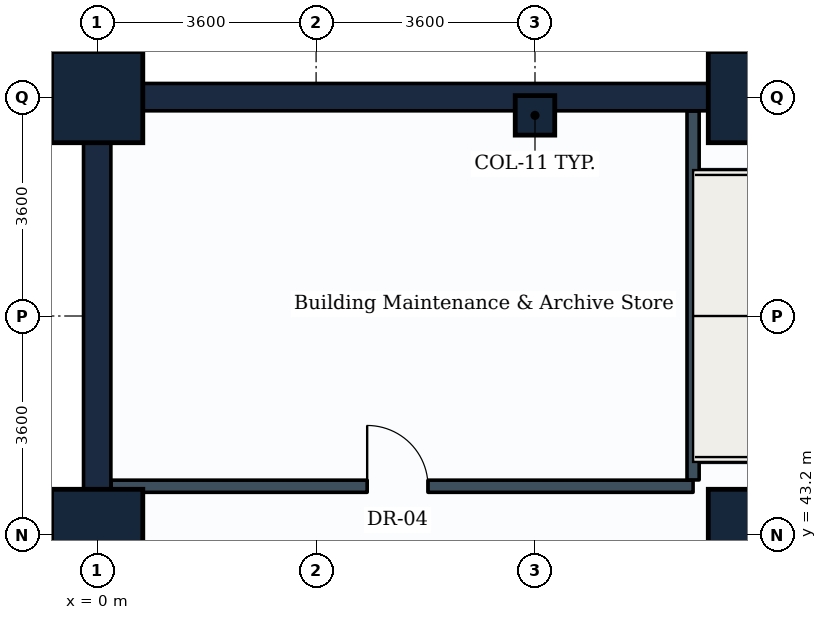
"""IFC4 building model, lengths in metres.
Left out: names, types, materials, properties, quantities, classifications, styles, units other than length and angle.
Written with IfcOpenShell. Run it as: python <this file> out.ifc"""

import sys

from ifc_helpers import new_model, si_unit, direction, frame, frame_2d, origin, origin_2d, place, context, subcontext, project, spatial, rectangle, extrude, element, fill, save


model = new_model("IFC4")
c1 = context("Model", 3, precision=1e-05, world=origin(), true_north=direction((0.0, 1.0)))
c2 = subcontext(c1, "Body", "Model", "MODEL_VIEW")
j1 = project(units=[si_unit("LENGTHUNIT", "METRE"), si_unit("PLANEANGLEUNIT", "RADIAN")], contexts=[c1])
p1 = place(None, origin())
s1 = spatial("IfcSite", under=j1, at=p1, CompositionType="ELEMENT")
p2 = place(p1, origin())
s2 = spatial("IfcBuilding", under=s1, at=p2, CompositionType="ELEMENT")
p3 = place(p2, frame((0.0, 0.0, -9.6)))
s3 = spatial("IfcBuildingStorey", under=s2, at=p3, CompositionType="ELEMENT", Elevation=-9.6)
for number, where, z_axis, x_axis in (
    (1, (0.0, 43.2, 0.0), (0.0, 0.0, 1.0), (1.0, 0.0, 0.0)),
    (2, (0.0, 50.4, 0.0), (0.0, 0.0, 1.0), (1.0, 0.0, 0.0)),
    (3, (10.8, 43.2, 0.0), (0.0, 0.0, 1.0), (1.0, 0.0, 0.0)),
    (4, (10.8, 50.4, 0.0), (0.0, 0.0, 1.0), (1.0, 0.0, 0.0)),
):
    element("IfcColumn", number, at=place(p3, frame(where, z_axis=z_axis, x_axis=x_axis)), inside=s3, PredefinedType="COLUMN", context=c2, shape_type="SweptSolid", body=[
        extrude(rectangle(XDim=1.5, YDim=1.5, at=origin_2d()), origin(), (0.0, 0.0, 1.0), 4.8),
    ])
p4 = place(p3, frame((7.2, 50.1, 0.0), z_axis=(0.0, 0.0, 1.0), x_axis=(1.0, 0.0, 0.0)))
e5 = element("IfcColumn", 5, at=p4, inside=s3, PredefinedType="PILASTER", context=c2, shape_type="SweptSolid", body=[
    extrude(rectangle(XDim=0.65, YDim=0.65, at=origin_2d()), origin(), (0.0, 0.0, 1.0), 4.8),
])
p5 = place(p3, frame((72.0, 50.4, 0.0), z_axis=(0.0, 0.0, 1.0), x_axis=(-1.0, 0.0, 0.0)))
e6 = element("IfcWall", 6, at=p5, inside=s3, PredefinedType="SOLIDWALL", context=c2, shape_type="SweptSolid", body=[
    extrude(rectangle(XDim=72.0, YDim=0.45, at=frame_2d((36.0, 0.0))), origin(), (0.0, 0.0, 1.0), 4.45),
])
p6 = place(p3, frame((0.0, 50.4, 0.0), z_axis=(0.0, 0.0, 1.0), x_axis=(0.0, -1.0, 0.0)))
e7 = element("IfcWall", 7, at=p6, inside=s3, PredefinedType="SOLIDWALL", context=c2, shape_type="SweptSolid", body=[
    extrude(rectangle(XDim=50.4, YDim=0.45, at=frame_2d((25.2, 0.0))), origin(), (0.0, 0.0, 1.0), 4.45),
])
p7 = place(p3, frame((0.229, 44.0, 0.0), z_axis=(0.0, 0.0, 1.0), x_axis=(1.0, 0.0, 0.0)))
e8 = element("IfcWall", 8, at=p7, inside=s3, PredefinedType="PARTITIONING", context=c2, shape_type="SweptSolid", body=[
    extrude(rectangle(XDim=9.571, YDim=0.2, at=frame_2d((4.786, 0.0))), origin(), (0.0, 0.0, 1.0), 3.93),
])
p8 = place(p7, frame((4.211, 0.0, 0.0)))
e9 = element("IfcOpeningElement", 9, at=p8, cuts=e8, PredefinedType="OPENING", context=c2, shape_type="SweptSolid", body=[
    extrude(rectangle(XDim=1.0, YDim=2.1, at=frame_2d((0.5, 1.05))), frame((0.0, 0.11, 0.0), z_axis=(0.0, -1.0, 0.0), x_axis=(1.0, 0.0, 0.0)), (0.0, 0.0, 1.0), 0.22),
])
p9 = place(p3, frame((9.8, 44.104, 0.0), z_axis=(0.0, 0.0, 1.0), x_axis=(0.0, 1.0, 0.0)))
e10 = element("IfcWall", 10, at=p9, inside=s3, PredefinedType="PARTITIONING", context=c2, shape_type="SweptSolid", body=[
    extrude(rectangle(XDim=6.067, YDim=0.2, at=frame_2d((3.033, 0.0))), origin(), (0.0, 0.0, 1.0), 4.435),
])
p10 = place(p8, origin())
e11 = element("IfcDoor", 11, at=p10, inside=s3, OperationType="SINGLE_SWING_LEFT", PredefinedType="DOOR", context=c2, shape_type="SweptSolid", body=[
    extrude(rectangle(XDim=1.0, YDim=2.1, at=frame_2d((0.5, 1.05))), frame((0.0, 0.025, 0.0), z_axis=(0.0, -1.0, 0.0), x_axis=(1.0, 0.0, 0.0)), (0.0, 0.0, 1.0), 0.05),
])
fill(e9, e11)
save(model, sys.argv[1])
